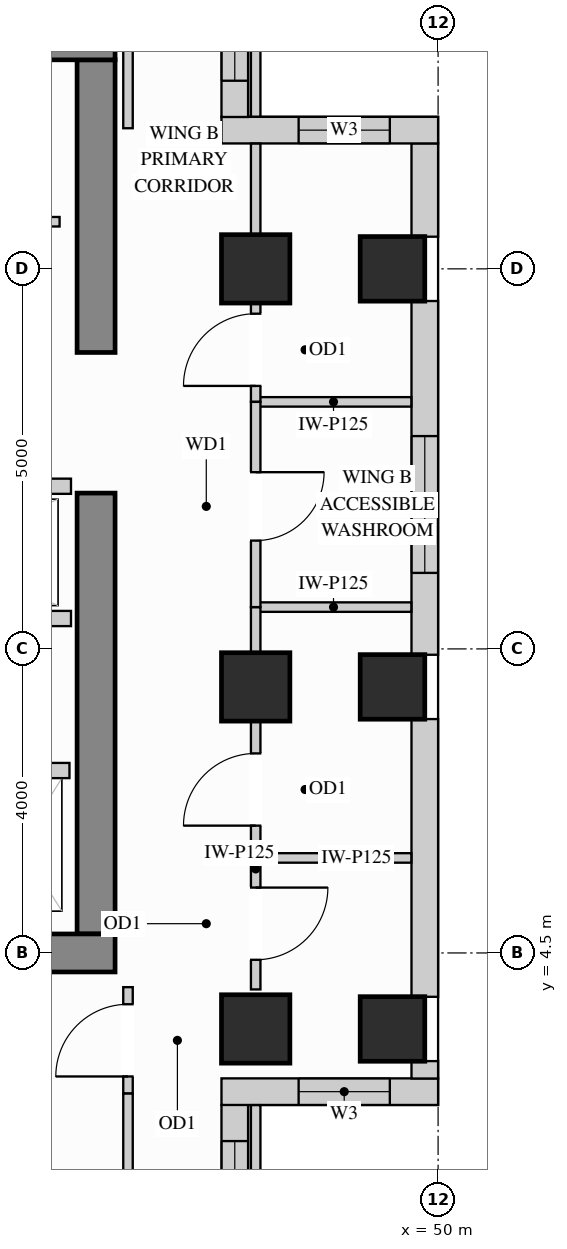
"""IFC4 building model, lengths in metres.
Left out: names, types, materials, properties, quantities, classifications, styles, units other than length and angle.
Written with IfcOpenShell. Run it as: python <this file> out.ifc"""

import sys

from ifc_helpers import new_model, si_unit, direction, frame, frame_2d, origin, origin_2d, place, context, subcontext, project, spatial, rectangle, extrude, source, transform, mapped, element, fill, save


model = new_model("IFC4")
c1 = context("Model", 3, precision=1e-05, world=origin(), true_north=direction((0.0, 1.0)))
c2 = subcontext(c1, "Body", "Model", "MODEL_VIEW")
j1 = project(units=[si_unit("LENGTHUNIT", "METRE"), si_unit("PLANEANGLEUNIT", "RADIAN")], contexts=[c1])
p1 = place(None, origin())
s1 = spatial("IfcSite", under=j1, at=p1, CompositionType="ELEMENT")
p2 = place(p1, origin())
s2 = spatial("IfcBuilding", under=s1, at=p2, CompositionType="ELEMENT")
p3 = place(p2, frame((0.0, 0.0, 230.4)))
s3 = spatial("IfcBuildingStorey", under=s2, at=p3, CompositionType="ELEMENT", Elevation=230.4)
m1 = source(origin(), c2, "Body", "SweptSolid", [
    extrude(rectangle(XDim=0.9, YDim=0.9, at=origin_2d()), origin(), (0.0, 0.0, 1.0), 3.4),
])
for number, where, z_axis, x_axis in (
    (1, (47.6, 13.5, 0.0), (0.0, 0.0, 1.0), (1.0, 0.0, 0.0)),
    (2, (47.6, 3.5, 0.0), (0.0, 0.0, 1.0), (1.0, 0.0, 0.0)),
    (3, (47.6, 8.0, 0.0), (0.0, 0.0, 1.0), (1.0, 0.0, 0.0)),
):
    element("IfcColumn", number, at=place(p3, frame(where, z_axis=z_axis, x_axis=x_axis)), inside=s3, PredefinedType="COLUMN", context=c2, shape_type="MappedRepresentation", body=[
        mapped(m1, transform((0.0, 0.0, 0.0), x_axis=(1.0, 0.0, 0.0), y_axis=(0.0, 1.0, 0.0), z_axis=(0.0, 0.0, 1.0))),
    ])
m2 = source(origin(), c2, "Body", "SweptSolid", [
    extrude(rectangle(XDim=0.85, YDim=0.85, at=origin_2d()), origin(), (0.0, 0.0, 1.0), 3.4),
])
for number, where, z_axis, x_axis in (
    (4, (49.4, 13.5, 0.0), (0.0, 0.0, 1.0), (1.0, 0.0, 0.0)),
    (5, (49.4, 3.5, 0.0), (0.0, 0.0, 1.0), (1.0, 0.0, 0.0)),
    (6, (49.4, 8.0, 0.0), (0.0, 0.0, 1.0), (1.0, 0.0, 0.0)),
):
    element("IfcColumn", number, at=place(p3, frame(where, z_axis=z_axis, x_axis=x_axis)), inside=s3, PredefinedType="COLUMN", context=c2, shape_type="MappedRepresentation", body=[
        mapped(m2, transform((0.0, 0.0, 0.0), x_axis=(1.0, 0.0, 0.0), y_axis=(0.0, 1.0, 0.0), z_axis=(0.0, 0.0, 1.0))),
    ])
m3 = source(origin(), c2, "Body", "SweptSolid", [
    extrude(rectangle(XDim=5.8, YDim=0.5, at=frame_2d((2.9, 0.0))), origin(), (0.0, 0.0, 1.0), 3.4),
])
p4 = place(p3, frame((45.5, 4.75, 0.0), z_axis=(0.0, 0.0, 1.0), x_axis=(0.0, 1.0, 0.0)))
e7 = element("IfcWall", 7, at=p4, inside=s3, PredefinedType="SHEAR", context=c2, shape_type="MappedRepresentation", body=[
    mapped(m3, transform((0.0, 0.0, 0.0), x_axis=(1.0, 0.0, 0.0), y_axis=(0.0, 1.0, 0.0), z_axis=(0.0, 0.0, 1.0))),
])
m4 = source(origin(), c2, "Body", "SweptSolid", [
    extrude(rectangle(XDim=3.85, YDim=0.5, at=frame_2d((1.925, 0.0))), origin(), (0.0, 0.0, 1.0), 3.4),
])
p5 = place(p3, frame((45.5, 12.4, 0.0), z_axis=(0.0, 0.0, 1.0), x_axis=(0.0, 1.0, 0.0)))
e8 = element("IfcWall", 8, at=p5, inside=s3, PredefinedType="SHEAR", context=c2, shape_type="MappedRepresentation", body=[
    mapped(m4, transform((0.0, 0.0, 0.0), x_axis=(1.0, 0.0, 0.0), y_axis=(0.0, 1.0, 0.0), z_axis=(0.0, 0.0, 1.0))),
])
m5 = source(origin(), c2, "Body", "SweptSolid", [
    extrude(rectangle(XDim=10.0, YDim=0.5, at=frame_2d((5.0, 0.0))), origin(), (0.0, 0.0, 1.0), 3.4),
])
for number, where, z_axis, x_axis in (
    (9, (35.75, 16.5, 0.0), (0.0, 0.0, 1.0), (1.0, 0.0, 0.0)),
    (10, (35.75, 4.5, 0.0), (0.0, 0.0, 1.0), (1.0, 0.0, 0.0)),
):
    element("IfcWall", number, at=place(p3, frame(where, z_axis=z_axis, x_axis=x_axis)), inside=s3, PredefinedType="SHEAR", context=c2, shape_type="MappedRepresentation", body=[
        mapped(m5, transform((0.0, 0.0, 0.0), x_axis=(1.0, 0.0, 0.0), y_axis=(0.0, 1.0, 0.0), z_axis=(0.0, 0.0, 1.0))),
    ])
p6 = place(p3, frame((47.325, 0.348, 0.0), z_axis=(0.0, 0.0, 1.0), x_axis=(0.0, 1.0, 0.0)))
e11 = element("IfcWall", 11, at=p6, inside=s3, PredefinedType="SOLIDWALL", context=c2, shape_type="SweptSolid", body=[
    extrude(rectangle(XDim=2.154, YDim=0.35, at=frame_2d((1.077, 0.0))), origin(), (0.0, 0.0, 1.0), 3.385),
])
p7 = place(p6, frame((0.477, 0.0, 0.78)))
e12 = element("IfcOpeningElement", 12, at=p7, cuts=e11, PredefinedType="OPENING", context=c2, shape_type="SweptSolid", body=[
    extrude(rectangle(XDim=1.2, YDim=2.1, at=frame_2d((0.6, 1.05))), frame((0.0, 0.185, 0.0), z_axis=(0.0, -1.0, 0.0), x_axis=(1.0, 0.0, 0.0)), (0.0, 0.0, 1.0), 0.37),
])
p8 = place(p3, frame((47.15, 2.675, 0.0), z_axis=(0.0, 0.0, 1.0), x_axis=(1.0, 0.0, 0.0)))
e13 = element("IfcWall", 13, at=p8, inside=s3, PredefinedType="SOLIDWALL", context=c2, shape_type="SweptSolid", body=[
    extrude(rectangle(XDim=2.85, YDim=0.35, at=frame_2d((1.425, 0.0))), origin(), (0.0, 0.0, 1.0), 3.385),
])
p9 = place(p8, frame((1.015, 0.0, 0.78)))
e14 = element("IfcOpeningElement", 14, at=p9, cuts=e13, PredefinedType="OPENING", context=c2, shape_type="SweptSolid", body=[
    extrude(rectangle(XDim=1.2, YDim=2.1, at=frame_2d((0.6, 1.05))), frame((0.0, 0.185, 0.0), z_axis=(0.0, -1.0, 0.0), x_axis=(1.0, 0.0, 0.0)), (0.0, 0.0, 1.0), 0.37),
])
m6 = source(origin(), c2, "Body", "SweptSolid", [
    extrude(rectangle(XDim=0.229, YDim=0.35, at=frame_2d((0.115, 0.0))), origin(), (0.0, 0.0, 1.0), 3.385),
])
p10 = place(p3, frame((49.825, 2.848, 0.0), z_axis=(0.0, 0.0, 1.0), x_axis=(0.0, 1.0, 0.0)))
e15 = element("IfcWall", 15, at=p10, inside=s3, PredefinedType="SOLIDWALL", context=c2, shape_type="MappedRepresentation", body=[
    mapped(m6, transform((0.0, 0.0, 0.0), x_axis=(1.0, 0.0, 0.0), y_axis=(0.0, 1.0, 0.0), z_axis=(0.0, 0.0, 1.0))),
])
m7 = source(origin(), c2, "Body", "SweptSolid", [
    extrude(rectangle(XDim=3.654, YDim=0.35, at=frame_2d((1.827, 0.0))), origin(), (0.0, 0.0, 1.0), 3.385),
])
p11 = place(p3, frame((49.825, 3.923, 0.0), z_axis=(0.0, 0.0, 1.0), x_axis=(0.0, 1.0, 0.0)))
e16 = element("IfcWall", 16, at=p11, inside=s3, PredefinedType="SOLIDWALL", context=c2, shape_type="MappedRepresentation", body=[
    mapped(m7, transform((0.0, 0.0, 0.0), x_axis=(1.0, 0.0, 0.0), y_axis=(0.0, 1.0, 0.0), z_axis=(0.0, 0.0, 1.0))),
])
p12 = place(p3, frame((49.825, 8.423, 0.0), z_axis=(0.0, 0.0, 1.0), x_axis=(0.0, 1.0, 0.0)))
e17 = element("IfcWall", 17, at=p12, inside=s3, PredefinedType="SOLIDWALL", context=c2, shape_type="SweptSolid", body=[
    extrude(rectangle(XDim=4.654, YDim=0.35, at=frame_2d((2.327, 0.0))), origin(), (0.0, 0.0, 1.0), 3.385),
])
p13 = place(p12, frame((1.077, 0.0, 0.78)))
e18 = element("IfcOpeningElement", 18, at=p13, cuts=e17, PredefinedType="OPENING", context=c2, shape_type="SweptSolid", body=[
    extrude(rectangle(XDim=1.8, YDim=2.1, at=frame_2d((0.9, 1.05))), frame((0.0, 0.185, 0.0), z_axis=(0.0, -1.0, 0.0), x_axis=(1.0, 0.0, 0.0)), (0.0, 0.0, 1.0), 0.37),
])
m8 = source(origin(), c2, "Body", "SweptSolid", [
    extrude(rectangle(XDim=1.229, YDim=0.35, at=frame_2d((0.615, 0.0))), origin(), (0.0, 0.0, 1.0), 3.385),
])
p14 = place(p3, frame((49.825, 13.923, 0.0), z_axis=(0.0, 0.0, 1.0), x_axis=(0.0, 1.0, 0.0)))
e19 = element("IfcWall", 19, at=p14, inside=s3, PredefinedType="SOLIDWALL", context=c2, shape_type="MappedRepresentation", body=[
    mapped(m8, transform((0.0, 0.0, 0.0), x_axis=(1.0, 0.0, 0.0), y_axis=(0.0, 1.0, 0.0), z_axis=(0.0, 0.0, 1.0))),
])
p15 = place(p3, frame((50.0, 15.325, 0.0), z_axis=(0.0, 0.0, 1.0), x_axis=(-1.0, 0.0, 0.0)))
e20 = element("IfcWall", 20, at=p15, inside=s3, PredefinedType="SOLIDWALL", context=c2, shape_type="SweptSolid", body=[
    extrude(rectangle(XDim=2.85, YDim=0.35, at=frame_2d((1.425, 0.0))), origin(), (0.0, 0.0, 1.0), 3.385),
])
p16 = place(p15, frame((0.635, 0.0, 0.78)))
e21 = element("IfcOpeningElement", 21, at=p16, cuts=e20, PredefinedType="OPENING", context=c2, shape_type="SweptSolid", body=[
    extrude(rectangle(XDim=1.2, YDim=2.1, at=frame_2d((0.6, 1.05))), frame((0.0, 0.185, 0.0), z_axis=(0.0, -1.0, 0.0), x_axis=(1.0, 0.0, 0.0)), (0.0, 0.0, 1.0), 0.37),
])
p17 = place(p3, frame((47.325, 15.498, 0.0), z_axis=(0.0, 0.0, 1.0), x_axis=(0.0, 1.0, 0.0)))
e22 = element("IfcWall", 22, at=p17, inside=s3, PredefinedType="SOLIDWALL", context=c2, shape_type="SweptSolid", body=[
    extrude(rectangle(XDim=2.154, YDim=0.35, at=frame_2d((1.077, 0.0))), origin(), (0.0, 0.0, 1.0), 3.385),
])
p18 = place(p17, frame((0.477, 0.0, 0.78)))
e23 = element("IfcOpeningElement", 23, at=p18, cuts=e22, PredefinedType="OPENING", context=c2, shape_type="SweptSolid", body=[
    extrude(rectangle(XDim=1.2, YDim=2.1, at=frame_2d((0.6, 1.05))), frame((0.0, 0.185, 0.0), z_axis=(0.0, -1.0, 0.0), x_axis=(1.0, 0.0, 0.0)), (0.0, 0.0, 1.0), 0.37),
])
p19 = place(p3, frame((41.8, 14.12, 0.0), z_axis=(0.0, 0.0, 1.0), x_axis=(1.0, 0.0, 0.0)))
e24 = element("IfcWall", 24, at=p19, inside=s3, PredefinedType="PARTITIONING", context=c2, shape_type="SweptSolid", body=[
    extrude(rectangle(XDim=3.22, YDim=0.125, at=frame_2d((1.61, 0.0))), origin(), (0.0, 0.0, 1.0), 3.385),
])
p20 = place(p19, frame((1.135, 0.0, 0.0)))
e25 = element("IfcOpeningElement", 25, at=p20, cuts=e24, PredefinedType="OPENING", context=c2, shape_type="SweptSolid", body=[
    extrude(rectangle(XDim=0.85, YDim=2.1, at=frame_2d((0.425, 1.05))), frame((0.0, 0.073, 0.0), z_axis=(0.0, -1.0, 0.0), x_axis=(1.0, 0.0, 0.0)), (0.0, 0.0, 1.0), 0.145),
])
m9 = source(origin(), c2, "Body", "SweptSolid", [
    extrude(rectangle(XDim=2.048, YDim=0.125, at=frame_2d((1.024, 0.0))), origin(), (0.0, 0.0, 1.0), 2.916),
])
p21 = place(p3, frame((47.6, 11.75, 0.0), z_axis=(0.0, 0.0, 1.0), x_axis=(1.0, 0.0, 0.0)))
e26 = element("IfcWall", 26, at=p21, inside=s3, PredefinedType="PARTITIONING", context=c2, shape_type="MappedRepresentation", body=[
    mapped(m9, transform((0.0, 0.0, 0.0), x_axis=(1.0, 0.0, 0.0), y_axis=(0.0, 1.0, 0.0), z_axis=(0.0, 0.0, 1.0))),
])
m10 = source(origin(), c2, "Body", "SweptSolid", [
    extrude(rectangle(XDim=2.048, YDim=0.125, at=frame_2d((1.024, 0.0))), origin(), (0.0, 0.0, 1.0), 3.385),
])
for number, where, z_axis, x_axis in (
    (27, (47.6, 5.75, 0.0), (0.0, 0.0, 1.0), (1.0, 0.0, 0.0)),
    (28, (47.6, 9.05, 0.0), (0.0, 0.0, 1.0), (1.0, 0.0, 0.0)),
):
    element("IfcWall", number, at=place(p3, frame(where, z_axis=z_axis, x_axis=x_axis)), inside=s3, PredefinedType="PARTITIONING", context=c2, shape_type="MappedRepresentation", body=[
        mapped(m10, transform((0.0, 0.0, 0.0), x_axis=(1.0, 0.0, 0.0), y_axis=(0.0, 1.0, 0.0), z_axis=(0.0, 0.0, 1.0))),
    ])
p22 = place(p3, frame((47.6, 4.02, 0.0), z_axis=(0.0, 0.0, 1.0), x_axis=(0.0, 1.0, 0.0)))
e29 = element("IfcWall", 29, at=p22, inside=s3, PredefinedType="PARTITIONING", context=c2, shape_type="SweptSolid", body=[
    extrude(rectangle(XDim=1.73, YDim=0.125, at=frame_2d((0.865, 0.0))), origin(), (0.0, 0.0, 1.0), 2.773),
])
p23 = place(p22, frame((0.39, 0.0, 0.0)))
e30 = element("IfcOpeningElement", 30, at=p23, cuts=e29, PredefinedType="OPENING", context=c2, shape_type="SweptSolid", body=[
    extrude(rectangle(XDim=0.95, YDim=2.15, at=frame_2d((0.475, 1.075))), frame((0.0, 0.073, 0.0), z_axis=(0.0, -1.0, 0.0), x_axis=(1.0, 0.0, 0.0)), (0.0, 0.0, 1.0), 0.145),
])
m11 = source(origin(), c2, "Body", "SweptSolid", [
    extrude(rectangle(XDim=2.148, YDim=0.125, at=frame_2d((1.074, 0.0))), origin(), (0.0, 0.0, 1.0), 3.385),
])
p24 = place(p3, frame((47.6, 0.35, 0.0), z_axis=(0.0, 0.0, 1.0), x_axis=(0.0, 1.0, 0.0)))
e31 = element("IfcWall", 31, at=p24, inside=s3, PredefinedType="PARTITIONING", context=c2, shape_type="MappedRepresentation", body=[
    mapped(m11, transform((0.0, 0.0, 0.0), x_axis=(1.0, 0.0, 0.0), y_axis=(0.0, 1.0, 0.0), z_axis=(0.0, 0.0, 1.0))),
])
p25 = place(p3, frame((47.6, 5.75, 0.0), z_axis=(0.0, 0.0, 1.0), x_axis=(0.0, 1.0, 0.0)))
e32 = element("IfcWall", 32, at=p25, inside=s3, PredefinedType="PARTITIONING", context=c2, shape_type="SweptSolid", body=[
    extrude(rectangle(XDim=1.8, YDim=0.125, at=frame_2d((0.9, 0.0))), origin(), (0.0, 0.0, 1.0), 2.773),
])
p26 = place(p25, frame((0.425, 0.0, 0.0)))
e33 = element("IfcOpeningElement", 33, at=p26, cuts=e32, PredefinedType="OPENING", context=c2, shape_type="SweptSolid", body=[
    extrude(rectangle(XDim=0.95, YDim=2.15, at=frame_2d((0.475, 1.075))), frame((0.0, 0.073, 0.0), z_axis=(0.0, -1.0, 0.0), x_axis=(1.0, 0.0, 0.0)), (0.0, 0.0, 1.0), 0.145),
])
m12 = source(origin(), c2, "Body", "SweptSolid", [
    extrude(rectangle(XDim=0.6, YDim=0.125, at=frame_2d((0.3, 0.0))), origin(), (0.0, 0.0, 1.0), 2.773),
])
p27 = place(p3, frame((47.6, 8.45, 0.0), z_axis=(0.0, 0.0, 1.0), x_axis=(0.0, 1.0, 0.0)))
e34 = element("IfcWall", 34, at=p27, inside=s3, PredefinedType="PARTITIONING", context=c2, shape_type="MappedRepresentation", body=[
    mapped(m12, transform((0.0, 0.0, 0.0), x_axis=(1.0, 0.0, 0.0), y_axis=(0.0, 1.0, 0.0), z_axis=(0.0, 0.0, 1.0))),
])
p28 = place(p3, frame((47.6, 11.75, 0.0), z_axis=(0.0, 0.0, 1.0), x_axis=(0.0, 1.0, 0.0)))
e35 = element("IfcWall", 35, at=p28, inside=s3, PredefinedType="PARTITIONING", context=c2, shape_type="SweptSolid", body=[
    extrude(rectangle(XDim=1.3, YDim=0.125, at=frame_2d((0.65, 0.0))), origin(), (0.0, 0.0, 1.0), 2.773),
])
p29 = place(p28, frame((0.21, 0.0, 0.0)))
e36 = element("IfcOpeningElement", 36, at=p29, cuts=e35, PredefinedType="OPENING", context=c2, shape_type="SweptSolid", body=[
    extrude(rectangle(XDim=0.95, YDim=2.15, at=frame_2d((0.475, 1.075))), frame((0.0, 0.073, 0.0), z_axis=(0.0, -1.0, 0.0), x_axis=(1.0, 0.0, 0.0)), (0.0, 0.0, 1.0), 0.145),
])
m13 = source(origin(), c2, "Body", "SweptSolid", [
    extrude(rectangle(XDim=1.198, YDim=0.125, at=frame_2d((0.599, 0.0))), origin(), (0.0, 0.0, 1.0), 3.385),
])
p30 = place(p3, frame((47.6, 13.95, 0.0), z_axis=(0.0, 0.0, 1.0), x_axis=(0.0, 1.0, 0.0)))
e37 = element("IfcWall", 37, at=p30, inside=s3, PredefinedType="PARTITIONING", context=c2, shape_type="MappedRepresentation", body=[
    mapped(m13, transform((0.0, 0.0, 0.0), x_axis=(1.0, 0.0, 0.0), y_axis=(0.0, 1.0, 0.0), z_axis=(0.0, 0.0, 1.0))),
])
p31 = place(p3, frame((47.6, 15.502, 0.0), z_axis=(0.0, 0.0, 1.0), x_axis=(0.0, 1.0, 0.0)))
e38 = element("IfcWall", 38, at=p31, inside=s3, PredefinedType="PARTITIONING", context=c2, shape_type="MappedRepresentation", body=[
    mapped(m11, transform((0.0, 0.0, 0.0), x_axis=(1.0, 0.0, 0.0), y_axis=(0.0, 1.0, 0.0), z_axis=(0.0, 0.0, 1.0))),
])
p32 = place(p3, frame((47.6, 9.05, 0.0), z_axis=(0.0, 0.0, 1.0), x_axis=(0.0, 1.0, 0.0)))
e39 = element("IfcWall", 39, at=p32, inside=s3, PredefinedType="PARTITIONING", context=c2, shape_type="SweptSolid", body=[
    extrude(rectangle(XDim=2.7, YDim=0.125, at=frame_2d((1.35, 0.0))), origin(), (0.0, 0.0, 1.0), 2.773),
])
p33 = place(p32, frame((0.875, 0.0, 0.0)))
e40 = element("IfcOpeningElement", 40, at=p33, cuts=e39, PredefinedType="OPENING", context=c2, shape_type="SweptSolid", body=[
    extrude(rectangle(XDim=0.9, YDim=2.15, at=frame_2d((0.45, 1.075))), frame((0.0, 0.073, 0.0), z_axis=(0.0, -1.0, 0.0), x_axis=(1.0, 0.0, 0.0)), (0.0, 0.0, 1.0), 0.145),
])
m14 = source(origin(), c2, "Body", "SweptSolid", [
    extrude(rectangle(XDim=2.298, YDim=0.125, at=frame_2d((1.149, 0.0))), origin(), (0.0, 0.0, 1.0), 3.385),
])
p34 = place(p3, frame((45.92, 15.35, 0.0), z_axis=(0.0, 0.0, 1.0), x_axis=(0.0, 1.0, 0.0)))
e41 = element("IfcWall", 41, at=p34, inside=s3, PredefinedType="PARTITIONING", context=c2, shape_type="MappedRepresentation", body=[
    mapped(m14, transform((0.0, 0.0, 0.0), x_axis=(1.0, 0.0, 0.0), y_axis=(0.0, 1.0, 0.0), z_axis=(0.0, 0.0, 1.0))),
])
p35 = place(p3, frame((45.92, 2.65, 0.0), z_axis=(0.0, 0.0, 1.0), x_axis=(0.0, 1.0, 0.0)))
e42 = element("IfcWall", 42, at=p35, inside=s3, PredefinedType="PARTITIONING", context=c2, shape_type="SweptSolid", body=[
    extrude(rectangle(XDim=1.4, YDim=0.125, at=frame_2d((0.7, 0.0))), origin(), (0.0, 0.0, 1.0), 3.385),
])
p36 = place(p35, frame((0.225, 0.0, 0.0)))
e43 = element("IfcOpeningElement", 43, at=p36, cuts=e42, PredefinedType="OPENING", context=c2, shape_type="SweptSolid", body=[
    extrude(rectangle(XDim=0.95, YDim=2.15, at=frame_2d((0.475, 1.075))), frame((0.0, 0.073, 0.0), z_axis=(0.0, -1.0, 0.0), x_axis=(1.0, 0.0, 0.0)), (0.0, 0.0, 1.0), 0.145),
])
p37 = place(p3, frame((45.92, 0.352, 0.0), z_axis=(0.0, 0.0, 1.0), x_axis=(0.0, 1.0, 0.0)))
e44 = element("IfcWall", 44, at=p37, inside=s3, PredefinedType="PARTITIONING", context=c2, shape_type="MappedRepresentation", body=[
    mapped(m14, transform((0.0, 0.0, 0.0), x_axis=(1.0, 0.0, 0.0), y_axis=(0.0, 1.0, 0.0), z_axis=(0.0, 0.0, 1.0))),
])
m15 = source(origin(), c2, "Body", "SweptSolid", [
    extrude(rectangle(XDim=1.3, YDim=0.2, at=frame_2d((0.65, 0.0))), origin(), (0.0, 0.0, 1.0), 3.385),
])
p38 = place(p3, frame((43.85, 6.9, 0.0), z_axis=(0.0, 0.0, 1.0), x_axis=(1.0, 0.0, 0.0)))
e45 = element("IfcWall", 45, at=p38, inside=s3, PredefinedType="PARTITIONING", context=c2, shape_type="MappedRepresentation", body=[
    mapped(m15, transform((0.0, 0.0, 0.0), x_axis=(1.0, 0.0, 0.0), y_axis=(0.0, 1.0, 0.0), z_axis=(0.0, 0.0, 1.0))),
])
m16 = source(origin(), c2, "Body", "SweptSolid", [
    extrude(rectangle(XDim=3.49, YDim=0.2, at=frame_2d((1.745, 0.0))), origin(), (0.0, 0.0, 1.0), 3.385),
])
for number, where, z_axis, x_axis in (
    (46, (41.68, 10.64, 0.0), (0.0, 0.0, 1.0), (1.0, 0.0, 0.0)),
    (47, (41.68, 8.9, 0.0), (0.0, 0.0, 1.0), (1.0, 0.0, 0.0)),
):
    element("IfcWall", number, at=place(p3, frame(where, z_axis=z_axis, x_axis=x_axis)), inside=s3, PredefinedType="PARTITIONING", context=c2, shape_type="MappedRepresentation", body=[
        mapped(m16, transform((0.0, 0.0, 0.0), x_axis=(1.0, 0.0, 0.0), y_axis=(0.0, 1.0, 0.0), z_axis=(0.0, 0.0, 1.0))),
    ])
m17 = source(origin(), c2, "Body", "SweptSolid", [
    extrude(rectangle(XDim=0.95, YDim=2.15, at=frame_2d((0.475, 1.075))), frame((0.0, 0.025, 0.0), z_axis=(0.0, -1.0, 0.0), x_axis=(1.0, 0.0, 0.0)), (0.0, 0.0, 1.0), 0.05),
])
p39 = place(p36, origin())
e48 = element("IfcDoor", 48, at=p39, inside=s3, OperationType="SINGLE_SWING_LEFT", PredefinedType="DOOR", context=c2, shape_type="MappedRepresentation", body=[
    mapped(m17, transform((0.0, 0.0, 0.0), x_axis=(1.0, 0.0, 0.0), y_axis=(0.0, 1.0, 0.0), z_axis=(0.0, 0.0, 1.0))),
])
fill(e43, e48)
p40 = place(p23, origin())
e49 = element("IfcDoor", 49, at=p40, inside=s3, OperationType="SINGLE_SWING_RIGHT", PredefinedType="DOOR", context=c2, shape_type="MappedRepresentation", body=[
    mapped(m17, transform((0.0, 0.0, 0.0), x_axis=(1.0, 0.0, 0.0), y_axis=(0.0, 1.0, 0.0), z_axis=(0.0, 0.0, 1.0))),
])
fill(e30, e49)
p41 = place(p26, origin())
e50 = element("IfcDoor", 50, at=p41, inside=s3, OperationType="SINGLE_SWING_LEFT", PredefinedType="DOOR", context=c2, shape_type="MappedRepresentation", body=[
    mapped(m17, transform((0.0, 0.0, 0.0), x_axis=(1.0, 0.0, 0.0), y_axis=(0.0, 1.0, 0.0), z_axis=(0.0, 0.0, 1.0))),
])
fill(e33, e50)
p42 = place(p29, origin())
e51 = element("IfcDoor", 51, at=p42, inside=s3, OperationType="SINGLE_SWING_LEFT", PredefinedType="DOOR", context=c2, shape_type="MappedRepresentation", body=[
    mapped(m17, transform((0.0, 0.0, 0.0), x_axis=(1.0, 0.0, 0.0), y_axis=(0.0, 1.0, 0.0), z_axis=(0.0, 0.0, 1.0))),
])
fill(e36, e51)
m18 = source(origin(), c2, "Body", "SweptSolid", [
    extrude(rectangle(XDim=0.9, YDim=2.15, at=frame_2d((0.45, 1.075))), frame((0.0, 0.025, 0.0), z_axis=(0.0, -1.0, 0.0), x_axis=(1.0, 0.0, 0.0)), (0.0, 0.0, 1.0), 0.05),
])
p43 = place(p33, origin())
e52 = element("IfcDoor", 52, at=p43, inside=s3, OperationType="SINGLE_SWING_RIGHT", PredefinedType="DOOR", context=c2, shape_type="MappedRepresentation", body=[
    mapped(m18, transform((0.0, 0.0, 0.0), x_axis=(1.0, 0.0, 0.0), y_axis=(0.0, 1.0, 0.0), z_axis=(0.0, 0.0, 1.0))),
])
fill(e40, e52)
m19 = source(origin(), c2, "Body", "SweptSolid", [
    extrude(rectangle(XDim=1.8, YDim=2.1, at=frame_2d((0.9, 1.05))), frame((0.0, 0.03, 0.0), z_axis=(0.0, -1.0, 0.0), x_axis=(1.0, 0.0, 0.0)), (0.0, 0.0, 1.0), 0.06),
])
p44 = place(p13, origin())
e53 = element("IfcWindow", 53, at=p44, inside=s3, PartitioningType="SINGLE_PANEL", PredefinedType="WINDOW", context=c2, shape_type="MappedRepresentation", body=[
    mapped(m19, transform((0.0, 0.0, 0.0), x_axis=(1.0, 0.0, 0.0), y_axis=(0.0, 1.0, 0.0), z_axis=(0.0, 0.0, 1.0))),
])
fill(e18, e53)
m20 = source(origin(), c2, "Body", "SweptSolid", [
    extrude(rectangle(XDim=1.2, YDim=2.1, at=frame_2d((0.6, 1.05))), frame((0.0, 0.03, 0.0), z_axis=(0.0, -1.0, 0.0), x_axis=(1.0, 0.0, 0.0)), (0.0, 0.0, 1.0), 0.06),
])
p45 = place(p7, origin())
e54 = element("IfcWindow", 54, at=p45, inside=s3, PartitioningType="SINGLE_PANEL", PredefinedType="WINDOW", context=c2, shape_type="MappedRepresentation", body=[
    mapped(m20, transform((0.0, 0.0, 0.0), x_axis=(1.0, 0.0, 0.0), y_axis=(0.0, 1.0, 0.0), z_axis=(0.0, 0.0, 1.0))),
])
fill(e12, e54)
p46 = place(p9, origin())
e55 = element("IfcWindow", 55, at=p46, inside=s3, PartitioningType="SINGLE_PANEL", PredefinedType="WINDOW", context=c2, shape_type="MappedRepresentation", body=[
    mapped(m20, transform((0.0, 0.0, 0.0), x_axis=(1.0, 0.0, 0.0), y_axis=(0.0, 1.0, 0.0), z_axis=(0.0, 0.0, 1.0))),
])
fill(e14, e55)
p47 = place(p16, origin())
e56 = element("IfcWindow", 56, at=p47, inside=s3, PartitioningType="SINGLE_PANEL", PredefinedType="WINDOW", context=c2, shape_type="MappedRepresentation", body=[
    mapped(m20, transform((0.0, 0.0, 0.0), x_axis=(1.0, 0.0, 0.0), y_axis=(0.0, 1.0, 0.0), z_axis=(0.0, 0.0, 1.0))),
])
fill(e21, e56)
p48 = place(p18, origin())
e57 = element("IfcWindow", 57, at=p48, inside=s3, PartitioningType="SINGLE_PANEL", PredefinedType="WINDOW", context=c2, shape_type="MappedRepresentation", body=[
    mapped(m20, transform((0.0, 0.0, 0.0), x_axis=(1.0, 0.0, 0.0), y_axis=(0.0, 1.0, 0.0), z_axis=(0.0, 0.0, 1.0))),
])
fill(e23, e57)
save(model, sys.argv[1])
